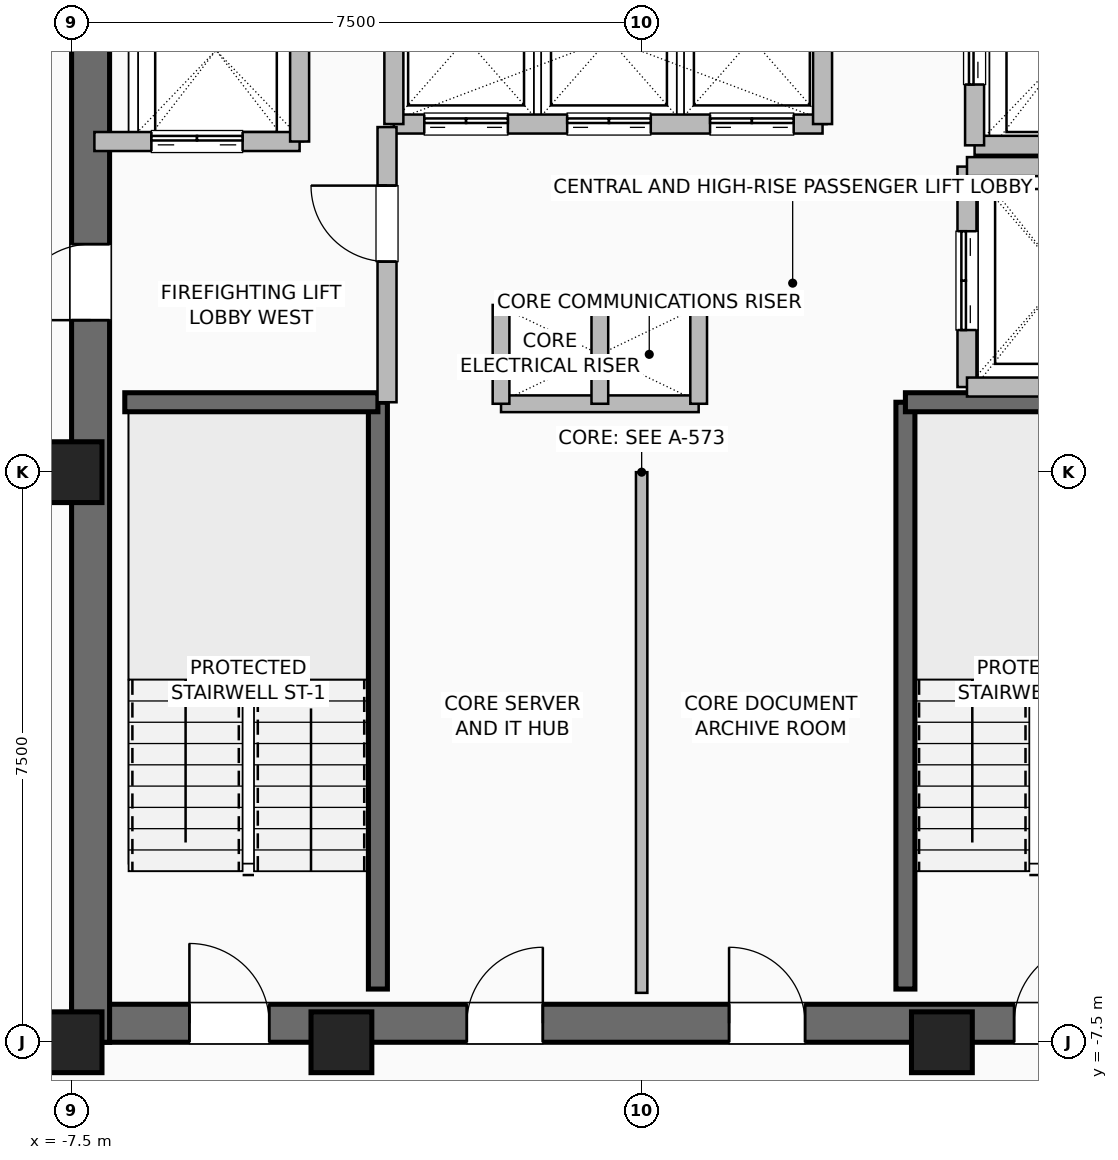
"""IFC4 building model, lengths in metres.
Left out: names, types, materials, properties, quantities, classifications, styles, units other than length and angle.
Written with IfcOpenShell. Run it as: python <this file> out.ifc"""

import sys

from ifc_helpers import new_model, si_unit, direction, frame, frame_2d, origin, origin_2d, place, context, subcontext, project, spatial, rectangle, hollow_rectangle, extrude, element, fill, save


model = new_model("IFC4")
c1 = context("Model", 3, precision=1e-05, world=origin(), true_north=direction((0.0, 1.0)))
c2 = subcontext(c1, "Body", "Model", "MODEL_VIEW")
j1 = project(units=[si_unit("LENGTHUNIT", "METRE"), si_unit("PLANEANGLEUNIT", "RADIAN")], contexts=[c1])
p1 = place(None, origin())
s1 = spatial("IfcSite", under=j1, at=p1, CompositionType="ELEMENT")
p2 = place(p1, origin())
s2 = spatial("IfcBuilding", under=s1, at=p2, CompositionType="ELEMENT")
p3 = place(p2, frame((0.0, 0.0, 290.0)))
s3 = spatial("IfcBuildingStorey", under=s2, at=p3, CompositionType="ELEMENT", Elevation=290.0)
for number, where, z_axis, x_axis in (
    (1, (-7.5, -7.5, 0.0), (0.0, 0.0, 1.0), (1.0, 0.0, 0.0)),
    (2, (-3.95, -7.5, 0.0), (0.0, 0.0, 1.0), (1.0, 0.0, 0.0)),
    (3, (3.95, -7.5, 0.0), (0.0, 0.0, 1.0), (1.0, 0.0, 0.0)),
    (4, (-7.5, 0.0, 0.0), (0.0, 0.0, 1.0), (1.0, 0.0, 0.0)),
):
    element("IfcColumn", number, at=place(p3, frame(where, z_axis=z_axis, x_axis=x_axis)), inside=s3, PredefinedType="COLUMN", context=c2, shape_type="SweptSolid", body=[
        extrude(hollow_rectangle(XDim=0.8, YDim=0.8, WallThickness=0.04, at=origin_2d()), origin(), (0.0, 0.0, 1.0), 3.6),
    ])
p4 = place(p3, frame((-7.5, -7.25, 0.0), z_axis=(0.0, 0.0, 1.0), x_axis=(1.0, 0.0, 0.0)))
e5 = element("IfcWall", 5, at=p4, inside=s3, PredefinedType="SHEAR", context=c2, shape_type="SweptSolid", body=[
    extrude(rectangle(XDim=15.0, YDim=0.5, at=frame_2d((7.5, 0.0))), origin(), (0.0, 0.0, 1.0), 3.36),
])
p5 = place(p4, frame((1.55, 0.0, 0.0)))
e6 = element("IfcOpeningElement", 6, at=p5, cuts=e5, PredefinedType="OPENING", context=c2, shape_type="SweptSolid", body=[
    extrude(rectangle(XDim=1.05, YDim=2.08, at=frame_2d((0.525, 1.04))), frame((0.0, 0.26, 0.0), z_axis=(0.0, -1.0, 0.0), x_axis=(1.0, 0.0, 0.0)), (0.0, 0.0, 1.0), 0.52),
])
p6 = place(p4, frame((12.4, 0.0, 0.0)))
e7 = element("IfcOpeningElement", 7, at=p6, cuts=e5, PredefinedType="OPENING", context=c2, shape_type="SweptSolid", body=[
    extrude(rectangle(XDim=1.05, YDim=2.08, at=frame_2d((0.525, 1.04))), frame((0.0, 0.26, 0.0), z_axis=(0.0, -1.0, 0.0), x_axis=(1.0, 0.0, 0.0)), (0.0, 0.0, 1.0), 0.52),
])
p7 = place(p4, frame((5.2, 0.0, 0.0)))
e8 = element("IfcOpeningElement", 8, at=p7, cuts=e5, PredefinedType="OPENING", context=c2, shape_type="SweptSolid", body=[
    extrude(rectangle(XDim=1.0, YDim=2.08, at=frame_2d((0.5, 1.04))), frame((0.0, 0.26, 0.0), z_axis=(0.0, -1.0, 0.0), x_axis=(1.0, 0.0, 0.0)), (0.0, 0.0, 1.0), 0.52),
])
p8 = place(p4, frame((8.65, 0.0, 0.0)))
e9 = element("IfcOpeningElement", 9, at=p8, cuts=e5, PredefinedType="OPENING", context=c2, shape_type="SweptSolid", body=[
    extrude(rectangle(XDim=1.0, YDim=2.08, at=frame_2d((0.5, 1.04))), frame((0.0, 0.26, 0.0), z_axis=(0.0, -1.0, 0.0), x_axis=(1.0, 0.0, 0.0)), (0.0, 0.0, 1.0), 0.52),
])
p9 = place(p3, frame((-7.25, -7.5, 0.0), z_axis=(0.0, 0.0, 1.0), x_axis=(0.0, 1.0, 0.0)))
e10 = element("IfcWall", 10, at=p9, inside=s3, PredefinedType="SHEAR", context=c2, shape_type="SweptSolid", body=[
    extrude(rectangle(XDim=15.0, YDim=0.5, at=frame_2d((7.5, 0.0))), origin(), (0.0, 0.0, 1.0), 3.36),
])
p10 = place(p9, frame((9.5, 0.0, 0.0)))
e11 = element("IfcOpeningElement", 11, at=p10, cuts=e10, PredefinedType="OPENING", context=c2, shape_type="SweptSolid", body=[
    extrude(rectangle(XDim=1.0, YDim=2.08, at=frame_2d((0.5, 1.04))), frame((0.0, 0.26, 0.0), z_axis=(0.0, -1.0, 0.0), x_axis=(1.0, 0.0, 0.0)), (0.0, 0.0, 1.0), 0.52),
])
p11 = place(p3, frame((-3.47, -6.8, 0.0), z_axis=(0.0, 0.0, 1.0), x_axis=(0.0, 1.0, 0.0)))
e12 = element("IfcWall", 12, at=p11, inside=s3, PredefinedType="SHEAR", context=c2, shape_type="SweptSolid", body=[
    extrude(rectangle(XDim=7.72, YDim=0.25, at=frame_2d((3.86, 0.0))), origin(), (0.0, 0.0, 1.0), 3.36),
])
p12 = place(p3, frame((-6.8, 0.92, 0.0), z_axis=(0.0, 0.0, 1.0), x_axis=(1.0, 0.0, 0.0)))
e13 = element("IfcWall", 13, at=p12, inside=s3, PredefinedType="SHEAR", context=c2, shape_type="SweptSolid", body=[
    extrude(rectangle(XDim=3.33, YDim=0.25, at=frame_2d((1.665, 0.0))), origin(), (0.0, 0.0, 1.0), 3.36),
])
p13 = place(p3, frame((3.47, -6.8, 0.0), z_axis=(0.0, 0.0, 1.0), x_axis=(0.0, 1.0, 0.0)))
e14 = element("IfcWall", 14, at=p13, inside=s3, PredefinedType="SHEAR", context=c2, shape_type="SweptSolid", body=[
    extrude(rectangle(XDim=7.72, YDim=0.25, at=frame_2d((3.86, 0.0))), origin(), (0.0, 0.0, 1.0), 3.36),
])
p14 = place(p3, frame((3.47, 0.92, 0.0), z_axis=(0.0, 0.0, 1.0), x_axis=(1.0, 0.0, 0.0)))
e15 = element("IfcWall", 15, at=p14, inside=s3, PredefinedType="SHEAR", context=c2, shape_type="SweptSolid", body=[
    extrude(rectangle(XDim=3.33, YDim=0.25, at=frame_2d((1.665, 0.0))), origin(), (0.0, 0.0, 1.0), 3.36),
])
for number, where, z_axis, x_axis in (
    (16, (-1.85, 2.2, 0.0), (0.0, 0.0, 1.0), (1.0, 0.0, 0.0)),
    (17, (-1.85, 0.9, 0.0), (0.0, 0.0, 1.0), (1.0, 0.0, 0.0)),
):
    element("IfcWall", number, at=place(p3, frame(where, z_axis=z_axis, x_axis=x_axis)), inside=s3, PredefinedType="PARTITIONING", context=c2, shape_type="SweptSolid", body=[
        extrude(rectangle(XDim=2.6, YDim=0.22, at=frame_2d((1.3, 0.0))), origin(), (0.0, 0.0, 1.0), 3.36),
    ])
for number, where, z_axis, x_axis in (
    (18, (-0.55, 0.9, 0.0), (0.0, 0.0, 1.0), (0.0, 1.0, 0.0)),
    (19, (0.75, 0.9, 0.0), (0.0, 0.0, 1.0), (0.0, 1.0, 0.0)),
    (20, (-1.85, 0.9, 0.0), (0.0, 0.0, 1.0), (0.0, 1.0, 0.0)),
):
    element("IfcWall", number, at=place(p3, frame(where, z_axis=z_axis, x_axis=x_axis)), inside=s3, PredefinedType="PARTITIONING", context=c2, shape_type="SweptSolid", body=[
        extrude(rectangle(XDim=1.3, YDim=0.22, at=frame_2d((0.65, 0.0))), origin(), (0.0, 0.0, 1.0), 3.36),
    ])
p15 = place(p3, frame((-3.26, 4.58, 0.0), z_axis=(0.0, 0.0, 1.0), x_axis=(1.0, 0.0, 0.0)))
e21 = element("IfcWall", 21, at=p15, inside=s3, PredefinedType="SHEAR", context=c2, shape_type="SweptSolid", body=[
    extrude(rectangle(XDim=5.64, YDim=0.25, at=frame_2d((2.82, 0.0))), origin(), (0.0, 0.0, 1.0), 3.36),
])
p16 = place(p15, frame((0.4, 0.0, 0.0)))
e22 = element("IfcOpeningElement", 22, at=p16, cuts=e21, PredefinedType="OPENING", context=c2, shape_type="SweptSolid", body=[
    extrude(rectangle(XDim=1.1, YDim=2.2, at=frame_2d((0.55, 1.1))), frame((0.0, 0.135, 0.0), z_axis=(0.0, -1.0, 0.0), x_axis=(1.0, 0.0, 0.0)), (0.0, 0.0, 1.0), 0.27),
])
p17 = place(p15, frame((2.28, 0.0, 0.0)))
e23 = element("IfcOpeningElement", 23, at=p17, cuts=e21, PredefinedType="OPENING", context=c2, shape_type="SweptSolid", body=[
    extrude(rectangle(XDim=1.1, YDim=2.2, at=frame_2d((0.55, 1.1))), frame((0.0, 0.135, 0.0), z_axis=(0.0, -1.0, 0.0), x_axis=(1.0, 0.0, 0.0)), (0.0, 0.0, 1.0), 0.27),
])
p18 = place(p15, frame((4.16, 0.0, 0.0)))
e24 = element("IfcOpeningElement", 24, at=p18, cuts=e21, PredefinedType="OPENING", context=c2, shape_type="SweptSolid", body=[
    extrude(rectangle(XDim=1.1, YDim=2.2, at=frame_2d((0.55, 1.1))), frame((0.0, 0.135, 0.0), z_axis=(0.0, -1.0, 0.0), x_axis=(1.0, 0.0, 0.0)), (0.0, 0.0, 1.0), 0.27),
])
for number, where, z_axis, x_axis in (
    (25, (-3.26, 4.58, 0.0), (0.0, 0.0, 1.0), (0.0, 1.0, 0.0)),
    (26, (2.38, 4.58, 0.0), (0.0, 0.0, 1.0), (0.0, 1.0, 0.0)),
):
    element("IfcWall", number, at=place(p3, frame(where, z_axis=z_axis, x_axis=x_axis)), inside=s3, PredefinedType="SHEAR", context=c2, shape_type="SweptSolid", body=[
        extrude(rectangle(XDim=2.22, YDim=0.25, at=frame_2d((1.11, 0.0))), origin(), (0.0, 0.0, 1.0), 3.36),
    ])
p19 = place(p3, frame((-7.2, 4.35, 0.0), z_axis=(0.0, 0.0, 1.0), x_axis=(1.0, 0.0, 0.0)))
e27 = element("IfcWall", 27, at=p19, inside=s3, PredefinedType="SHEAR", context=c2, shape_type="SweptSolid", body=[
    extrude(rectangle(XDim=2.7, YDim=0.25, at=frame_2d((1.35, 0.0))), origin(), (0.0, 0.0, 1.0), 3.36),
])
p20 = place(p19, frame((0.75, 0.0, 0.0)))
e28 = element("IfcOpeningElement", 28, at=p20, cuts=e27, PredefinedType="OPENING", context=c2, shape_type="SweptSolid", body=[
    extrude(rectangle(XDim=1.2, YDim=2.2, at=frame_2d((0.6, 1.1))), frame((0.0, 0.135, 0.0), z_axis=(0.0, -1.0, 0.0), x_axis=(1.0, 0.0, 0.0)), (0.0, 0.0, 1.0), 0.27),
])
p21 = place(p3, frame((-4.5, 4.35, 0.0), z_axis=(0.0, 0.0, 1.0), x_axis=(0.0, 1.0, 0.0)))
e29 = element("IfcWall", 29, at=p21, inside=s3, PredefinedType="SHEAR", context=c2, shape_type="SweptSolid", body=[
    extrude(rectangle(XDim=2.85, YDim=0.25, at=frame_2d((1.425, 0.0))), origin(), (0.0, 0.0, 1.0), 3.36),
])
p22 = place(p3, frame((4.38, 4.3, 0.0), z_axis=(0.0, 0.0, 1.0), x_axis=(1.0, 0.0, 0.0)))
e30 = element("IfcWall", 30, at=p22, inside=s3, PredefinedType="SHEAR", context=c2, shape_type="SweptSolid", body=[
    extrude(rectangle(XDim=2.42, YDim=0.25, at=frame_2d((1.21, 0.0))), origin(), (0.0, 0.0, 1.0), 3.36),
])
p23 = place(p3, frame((4.38, 4.3, 0.0), z_axis=(0.0, 0.0, 1.0), x_axis=(0.0, 1.0, 0.0)))
e31 = element("IfcWall", 31, at=p23, inside=s3, PredefinedType="SHEAR", context=c2, shape_type="SweptSolid", body=[
    extrude(rectangle(XDim=2.5, YDim=0.25, at=frame_2d((1.25, 0.0))), origin(), (0.0, 0.0, 1.0), 3.36),
])
p24 = place(p23, frame((0.8, 0.0, 0.0)))
e32 = element("IfcOpeningElement", 32, at=p24, cuts=e31, PredefinedType="OPENING", context=c2, shape_type="SweptSolid", body=[
    extrude(rectangle(XDim=1.2, YDim=2.2, at=frame_2d((0.6, 1.1))), frame((0.0, 0.135, 0.0), z_axis=(0.0, -1.0, 0.0), x_axis=(1.0, 0.0, 0.0)), (0.0, 0.0, 1.0), 0.27),
])
p25 = place(p3, frame((4.28, 1.12, 0.0), z_axis=(0.0, 0.0, 1.0), x_axis=(0.0, 1.0, 0.0)))
e33 = element("IfcWall", 33, at=p25, inside=s3, PredefinedType="SHEAR", context=c2, shape_type="SweptSolid", body=[
    extrude(rectangle(XDim=2.9, YDim=0.25, at=frame_2d((1.45, 0.0))), origin(), (0.0, 0.0, 1.0), 3.36),
])
p26 = place(p25, frame((0.75, 0.0, 0.0)))
e34 = element("IfcOpeningElement", 34, at=p26, cuts=e33, PredefinedType="OPENING", context=c2, shape_type="SweptSolid", body=[
    extrude(rectangle(XDim=1.3, YDim=2.3, at=frame_2d((0.65, 1.15))), frame((0.0, 0.135, 0.0), z_axis=(0.0, -1.0, 0.0), x_axis=(1.0, 0.0, 0.0)), (0.0, 0.0, 1.0), 0.27),
])
for number, where, z_axis, x_axis in (
    (35, (4.28, 1.12, 0.0), (0.0, 0.0, 1.0), (1.0, 0.0, 0.0)),
    (36, (4.28, 4.02, 0.0), (0.0, 0.0, 1.0), (1.0, 0.0, 0.0)),
):
    element("IfcWall", number, at=place(p3, frame(where, z_axis=z_axis, x_axis=x_axis)), inside=s3, PredefinedType="SHEAR", context=c2, shape_type="SweptSolid", body=[
        extrude(rectangle(XDim=2.52, YDim=0.25, at=frame_2d((1.26, 0.0))), origin(), (0.0, 0.0, 1.0), 3.36),
    ])
p27 = place(p3, frame((-3.35, 0.92, 0.0), z_axis=(0.0, 0.0, 1.0), x_axis=(0.0, 1.0, 0.0)))
e37 = element("IfcWall", 37, at=p27, inside=s3, PredefinedType="SHEAR", context=c2, shape_type="SweptSolid", body=[
    extrude(rectangle(XDim=3.62, YDim=0.25, at=frame_2d((1.81, 0.0))), origin(), (0.0, 0.0, 1.0), 3.36),
])
p28 = place(p27, frame((1.85, 0.0, 0.0)))
e38 = element("IfcOpeningElement", 38, at=p28, cuts=e37, PredefinedType="OPENING", context=c2, shape_type="SweptSolid", body=[
    extrude(rectangle(XDim=1.0, YDim=2.08, at=frame_2d((0.5, 1.04))), frame((0.0, 0.135, 0.0), z_axis=(0.0, -1.0, 0.0), x_axis=(1.0, 0.0, 0.0)), (0.0, 0.0, 1.0), 0.27),
])
p29 = place(p3, frame((0.0, -6.85, 0.0), z_axis=(0.0, 0.0, 1.0), x_axis=(0.0, 1.0, 0.0)))
e39 = element("IfcWall", 39, at=p29, inside=s3, PredefinedType="PARTITIONING", context=c2, shape_type="SweptSolid", body=[
    extrude(rectangle(XDim=6.85, YDim=0.15, at=frame_2d((3.425, 0.0))), origin(), (0.0, 0.0, 1.0), 3.36),
])
p30 = place(p5, origin())
e40 = element("IfcDoor", 40, at=p30, inside=s3, OperationType="SINGLE_SWING_LEFT", PredefinedType="DOOR", context=c2, shape_type="SweptSolid", body=[
    extrude(rectangle(XDim=1.05, YDim=2.08, at=frame_2d((0.525, 1.04))), frame((0.0, 0.025, 0.0), z_axis=(0.0, -1.0, 0.0), x_axis=(1.0, 0.0, 0.0)), (0.0, 0.0, 1.0), 0.05),
])
fill(e6, e40)
p31 = place(p6, origin())
e41 = element("IfcDoor", 41, at=p31, inside=s3, OperationType="SINGLE_SWING_RIGHT", PredefinedType="DOOR", context=c2, shape_type="SweptSolid", body=[
    extrude(rectangle(XDim=1.05, YDim=2.08, at=frame_2d((0.525, 1.04))), frame((0.0, 0.025, 0.0), z_axis=(0.0, -1.0, 0.0), x_axis=(1.0, 0.0, 0.0)), (0.0, 0.0, 1.0), 0.05),
])
fill(e7, e41)
p32 = place(p10, origin())
e42 = element("IfcDoor", 42, at=p32, inside=s3, OperationType="SINGLE_SWING_LEFT", PredefinedType="DOOR", context=c2, shape_type="SweptSolid", body=[
    extrude(rectangle(XDim=1.0, YDim=2.08, at=frame_2d((0.5, 1.04))), frame((0.0, 0.025, 0.0), z_axis=(0.0, -1.0, 0.0), x_axis=(1.0, 0.0, 0.0)), (0.0, 0.0, 1.0), 0.05),
])
fill(e11, e42)
p33 = place(p7, origin())
e43 = element("IfcDoor", 43, at=p33, inside=s3, OperationType="SINGLE_SWING_RIGHT", PredefinedType="DOOR", context=c2, shape_type="SweptSolid", body=[
    extrude(rectangle(XDim=1.0, YDim=2.08, at=frame_2d((0.5, 1.04))), frame((0.0, 0.025, 0.0), z_axis=(0.0, -1.0, 0.0), x_axis=(1.0, 0.0, 0.0)), (0.0, 0.0, 1.0), 0.05),
])
fill(e8, e43)
p34 = place(p8, origin())
e44 = element("IfcDoor", 44, at=p34, inside=s3, OperationType="SINGLE_SWING_LEFT", PredefinedType="DOOR", context=c2, shape_type="SweptSolid", body=[
    extrude(rectangle(XDim=1.0, YDim=2.08, at=frame_2d((0.5, 1.04))), frame((0.0, 0.025, 0.0), z_axis=(0.0, -1.0, 0.0), x_axis=(1.0, 0.0, 0.0)), (0.0, 0.0, 1.0), 0.05),
])
fill(e9, e44)
p35 = place(p16, origin())
e45 = element("IfcDoor", 45, at=p35, inside=s3, OperationType="DOUBLE_DOOR_SLIDING", PredefinedType="DOOR", context=c2, shape_type="SweptSolid", body=[
    extrude(rectangle(XDim=1.1, YDim=2.2, at=frame_2d((0.55, 1.1))), frame((0.0, 0.025, 0.0), z_axis=(0.0, -1.0, 0.0), x_axis=(1.0, 0.0, 0.0)), (0.0, 0.0, 1.0), 0.05),
])
fill(e22, e45)
p36 = place(p17, origin())
e46 = element("IfcDoor", 46, at=p36, inside=s3, OperationType="DOUBLE_DOOR_SLIDING", PredefinedType="DOOR", context=c2, shape_type="SweptSolid", body=[
    extrude(rectangle(XDim=1.1, YDim=2.2, at=frame_2d((0.55, 1.1))), frame((0.0, 0.025, 0.0), z_axis=(0.0, -1.0, 0.0), x_axis=(1.0, 0.0, 0.0)), (0.0, 0.0, 1.0), 0.05),
])
fill(e23, e46)
p37 = place(p18, origin())
e47 = element("IfcDoor", 47, at=p37, inside=s3, OperationType="DOUBLE_DOOR_SLIDING", PredefinedType="DOOR", context=c2, shape_type="SweptSolid", body=[
    extrude(rectangle(XDim=1.1, YDim=2.2, at=frame_2d((0.55, 1.1))), frame((0.0, 0.025, 0.0), z_axis=(0.0, -1.0, 0.0), x_axis=(1.0, 0.0, 0.0)), (0.0, 0.0, 1.0), 0.05),
])
fill(e24, e47)
p38 = place(p20, origin())
e48 = element("IfcDoor", 48, at=p38, inside=s3, OperationType="DOUBLE_DOOR_SLIDING", PredefinedType="DOOR", context=c2, shape_type="SweptSolid", body=[
    extrude(rectangle(XDim=1.2, YDim=2.2, at=frame_2d((0.6, 1.1))), frame((0.0, 0.025, 0.0), z_axis=(0.0, -1.0, 0.0), x_axis=(1.0, 0.0, 0.0)), (0.0, 0.0, 1.0), 0.05),
])
fill(e28, e48)
p39 = place(p24, origin())
e49 = element("IfcDoor", 49, at=p39, inside=s3, OperationType="DOUBLE_DOOR_SLIDING", PredefinedType="DOOR", context=c2, shape_type="SweptSolid", body=[
    extrude(rectangle(XDim=1.2, YDim=2.2, at=frame_2d((0.6, 1.1))), frame((0.0, 0.025, 0.0), z_axis=(0.0, -1.0, 0.0), x_axis=(1.0, 0.0, 0.0)), (0.0, 0.0, 1.0), 0.05),
])
fill(e32, e49)
p40 = place(p26, origin())
e50 = element("IfcDoor", 50, at=p40, inside=s3, OperationType="DOUBLE_DOOR_SLIDING", PredefinedType="DOOR", context=c2, shape_type="SweptSolid", body=[
    extrude(rectangle(XDim=1.3, YDim=2.3, at=frame_2d((0.65, 1.15))), frame((0.0, 0.025, 0.0), z_axis=(0.0, -1.0, 0.0), x_axis=(1.0, 0.0, 0.0)), (0.0, 0.0, 1.0), 0.05),
])
fill(e34, e50)
p41 = place(p28, origin())
e51 = element("IfcDoor", 51, at=p41, inside=s3, OperationType="SINGLE_SWING_RIGHT", PredefinedType="DOOR", context=c2, shape_type="SweptSolid", body=[
    extrude(rectangle(XDim=1.0, YDim=2.08, at=frame_2d((0.5, 1.04))), frame((0.0, 0.025, 0.0), z_axis=(0.0, -1.0, 0.0), x_axis=(1.0, 0.0, 0.0)), (0.0, 0.0, 1.0), 0.05),
])
fill(e38, e51)
save(model, sys.argv[1])
